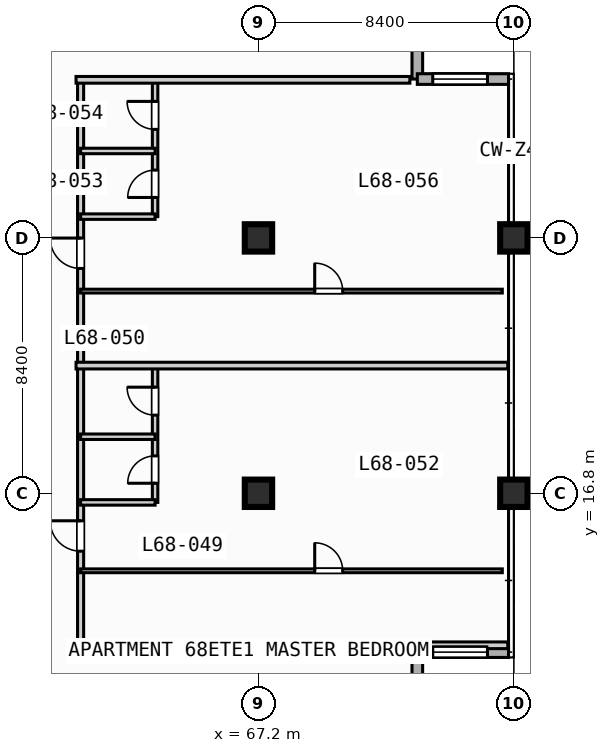
"""IFC4 building model, lengths in metres.
Left out: names, types, materials, properties, quantities, classifications, styles, units other than length and angle.
Written with IfcOpenShell. Run it as: python <this file> out.ifc"""

import sys

from ifc_helpers import new_model, si_unit, direction, frame, frame_2d, origin, origin_2d, place, context, subcontext, project, spatial, rectangle, extrude, element, fill, save


model = new_model("IFC4")
c1 = context("Model", 3, precision=1e-05, world=origin(), true_north=direction((0.0, 1.0)))
c2 = subcontext(c1, "Body", "Model", "MODEL_VIEW")
j1 = project(units=[si_unit("LENGTHUNIT", "METRE"), si_unit("PLANEANGLEUNIT", "RADIAN")], contexts=[c1])
p1 = place(None, origin())
s1 = spatial("IfcSite", under=j1, at=p1, CompositionType="ELEMENT")
p2 = place(p1, origin())
s2 = spatial("IfcBuilding", under=s1, at=p2, CompositionType="ELEMENT")
p3 = place(p2, frame((0.0, 0.0, 274.9)))
s3 = spatial("IfcBuildingStorey", under=s2, at=p3, CompositionType="ELEMENT", Elevation=274.9)
for number, where, z_axis, x_axis in (
    (1, (67.2, 16.8, 0.0), (0.0, 0.0, 1.0), (1.0, 0.0, 0.0)),
    (2, (67.2, 25.2, 0.0), (0.0, 0.0, 1.0), (1.0, 0.0, 0.0)),
    (3, (75.6, 16.8, 0.0), (0.0, 0.0, 1.0), (1.0, 0.0, 0.0)),
    (4, (75.6, 25.2, 0.0), (0.0, 0.0, 1.0), (1.0, 0.0, 0.0)),
):
    element("IfcColumn", number, at=place(p3, frame(where, z_axis=z_axis, x_axis=x_axis)), inside=s3, PredefinedType="COLUMN", context=c2, shape_type="SweptSolid", body=[
        extrude(rectangle(XDim=0.9, YDim=0.9, at=origin_2d()), origin(), (0.0, 0.0, 1.0), 3.7),
    ])
p4 = place(p3, frame((72.425, 33.425, 0.0), z_axis=(0.0, 0.0, 1.0), x_axis=(0.0, -1.0, 0.0)))
e5 = element("IfcWall", 5, at=p4, inside=s3, PredefinedType="STANDARD", context=c2, shape_type="SweptSolid", body=[
    extrude(rectangle(XDim=3.0, YDim=0.35, at=frame_2d((1.5, 0.0))), origin(), (0.0, 0.0, 1.0), 3.47),
])
p5 = place(p3, frame((72.425, 30.425, 0.0), z_axis=(0.0, 0.0, 1.0), x_axis=(1.0, 0.0, 0.0)))
e6 = element("IfcWall", 6, at=p5, inside=s3, PredefinedType="STANDARD", context=c2, shape_type="SweptSolid", body=[
    extrude(rectangle(XDim=3.0, YDim=0.35, at=frame_2d((1.5, 0.0))), origin(), (0.0, 0.0, 1.0), 3.47),
])
p6 = place(p5, frame((0.508, 0.0, 0.85)))
e7 = element("IfcOpeningElement", 7, at=p6, cuts=e6, PredefinedType="OPENING", context=c2, shape_type="SweptSolid", body=[
    extrude(rectangle(XDim=1.8, YDim=1.8, at=frame_2d((0.9, 0.9))), frame((0.0, 0.185, 0.0), z_axis=(0.0, -1.0, 0.0), x_axis=(1.0, 0.0, 0.0)), (0.0, 0.0, 1.0), 0.37),
])
p7 = place(p3, frame((75.425, 11.575, 0.0), z_axis=(0.0, 0.0, 1.0), x_axis=(-1.0, 0.0, 0.0)))
e8 = element("IfcWall", 8, at=p7, inside=s3, PredefinedType="STANDARD", context=c2, shape_type="SweptSolid", body=[
    extrude(rectangle(XDim=3.0, YDim=0.35, at=frame_2d((1.5, 0.0))), origin(), (0.0, 0.0, 1.0), 3.47),
])
p8 = place(p7, frame((0.692, 0.0, 0.85)))
e9 = element("IfcOpeningElement", 9, at=p8, cuts=e8, PredefinedType="OPENING", context=c2, shape_type="SweptSolid", body=[
    extrude(rectangle(XDim=1.8, YDim=1.8, at=frame_2d((0.9, 0.9))), frame((0.0, 0.185, 0.0), z_axis=(0.0, -1.0, 0.0), x_axis=(1.0, 0.0, 0.0)), (0.0, 0.0, 1.0), 0.37),
])
p9 = place(p3, frame((72.425, 11.575, 0.0), z_axis=(0.0, 0.0, 1.0), x_axis=(0.0, -1.0, 0.0)))
e10 = element("IfcWall", 10, at=p9, inside=s3, PredefinedType="STANDARD", context=c2, shape_type="SweptSolid", body=[
    extrude(rectangle(XDim=3.0, YDim=0.35, at=frame_2d((1.5, 0.0))), origin(), (0.0, 0.0, 1.0), 3.47),
])
p10 = place(p3, frame((61.35, 11.8, 0.0), z_axis=(0.0, 0.0, 1.0), x_axis=(0.0, 1.0, 0.0)))
e11 = element("IfcWall", 11, at=p10, inside=s3, PredefinedType="PARTITIONING", context=c2, shape_type="SweptSolid", body=[
    extrude(rectangle(XDim=18.6, YDim=0.2, at=frame_2d((9.3, 0.0))), origin(), (0.0, 0.0, 1.0), 3.47),
])
p11 = place(p10, frame((3.095, 0.0, 0.0)))
e12 = element("IfcOpeningElement", 12, at=p11, cuts=e11, PredefinedType="OPENING", context=c2, shape_type="SweptSolid", body=[
    extrude(rectangle(XDim=1.0, YDim=2.15, at=frame_2d((0.5, 1.075))), frame((0.0, 0.11, 0.0), z_axis=(0.0, -1.0, 0.0), x_axis=(1.0, 0.0, 0.0)), (0.0, 0.0, 1.0), 0.22),
])
p12 = place(p10, frame((12.395, 0.0, 0.0)))
e13 = element("IfcOpeningElement", 13, at=p12, cuts=e11, PredefinedType="OPENING", context=c2, shape_type="SweptSolid", body=[
    extrude(rectangle(XDim=1.0, YDim=2.15, at=frame_2d((0.5, 1.075))), frame((0.0, 0.11, 0.0), z_axis=(0.0, -1.0, 0.0), x_axis=(1.0, 0.0, 0.0)), (0.0, 0.0, 1.0), 0.22),
])
p13 = place(p3, frame((61.2, 11.8, 0.0), z_axis=(0.0, 0.0, 1.0), x_axis=(1.0, 0.0, 0.0)))
e14 = element("IfcWall", 14, at=p13, inside=s3, PredefinedType="PARTITIONING", context=c2, shape_type="SweptSolid", body=[
    extrude(rectangle(XDim=14.2, YDim=0.22, at=frame_2d((7.1, 0.0))), origin(), (0.0, 0.0, 1.0), 3.47),
])
p14 = place(p3, frame((63.8, 16.5, 0.0), z_axis=(0.0, 0.0, 1.0), x_axis=(0.0, 1.0, 0.0)))
e15 = element("IfcWall", 15, at=p14, inside=s3, PredefinedType="PLUMBINGWALL", context=c2, shape_type="SweptSolid", body=[
    extrude(rectangle(XDim=4.5, YDim=0.18, at=frame_2d((2.25, 0.0))), origin(), (0.0, 0.0, 1.0), 3.47),
])
p15 = place(p14, frame((0.63, 0.0, 0.0)))
e16 = element("IfcOpeningElement", 16, at=p15, cuts=e15, PredefinedType="OPENING", context=c2, shape_type="SweptSolid", body=[
    extrude(rectangle(XDim=0.9, YDim=2.1, at=frame_2d((0.45, 1.05))), frame((0.0, 0.1, 0.0), z_axis=(0.0, -1.0, 0.0), x_axis=(1.0, 0.0, 0.0)), (0.0, 0.0, 1.0), 0.2),
])
p16 = place(p14, frame((2.87, 0.0, 0.0)))
e17 = element("IfcOpeningElement", 17, at=p16, cuts=e15, PredefinedType="OPENING", context=c2, shape_type="SweptSolid", body=[
    extrude(rectangle(XDim=0.92, YDim=2.1, at=frame_2d((0.46, 1.05))), frame((0.0, 0.1, 0.0), z_axis=(0.0, -1.0, 0.0), x_axis=(1.0, 0.0, 0.0)), (0.0, 0.0, 1.0), 0.2),
])
for number, where, z_axis, x_axis in (
    (18, (61.35, 16.5, 0.0), (0.0, 0.0, 1.0), (1.0, 0.0, 0.0)),
    (19, (61.35, 18.66, 0.0), (0.0, 0.0, 1.0), (1.0, 0.0, 0.0)),
):
    element("IfcWall", number, at=place(p3, frame(where, z_axis=z_axis, x_axis=x_axis)), inside=s3, PredefinedType="PLUMBINGWALL", context=c2, shape_type="SweptSolid", body=[
        extrude(rectangle(XDim=2.45, YDim=0.18, at=frame_2d((1.225, 0.0))), origin(), (0.0, 0.0, 1.0), 3.47),
    ])
p17 = place(p3, frame((61.35, 14.25, 0.0), z_axis=(0.0, 0.0, 1.0), x_axis=(1.0, 0.0, 0.0)))
e20 = element("IfcWall", 20, at=p17, inside=s3, PredefinedType="PARTITIONING", context=c2, shape_type="SweptSolid", body=[
    extrude(rectangle(XDim=13.87, YDim=0.125, at=frame_2d((6.935, 0.0))), origin(), (0.0, 0.0, 1.0), 3.47),
])
p18 = place(p17, frame((7.7, 0.0, 0.0)))
e21 = element("IfcOpeningElement", 21, at=p18, cuts=e20, PredefinedType="OPENING", context=c2, shape_type="SweptSolid", body=[
    extrude(rectangle(XDim=0.92, YDim=2.1, at=frame_2d((0.46, 1.05))), frame((0.0, 0.073, 0.0), z_axis=(0.0, -1.0, 0.0), x_axis=(1.0, 0.0, 0.0)), (0.0, 0.0, 1.0), 0.145),
])
p19 = place(p3, frame((61.2, 21.0, 0.0), z_axis=(0.0, 0.0, 1.0), x_axis=(1.0, 0.0, 0.0)))
e22 = element("IfcWall", 22, at=p19, inside=s3, PredefinedType="PARTITIONING", context=c2, shape_type="SweptSolid", body=[
    extrude(rectangle(XDim=14.2, YDim=0.22, at=frame_2d((7.1, 0.0))), origin(), (0.0, 0.0, 1.0), 3.47),
])
p20 = place(p3, frame((63.8, 25.9, 0.0), z_axis=(0.0, 0.0, 1.0), x_axis=(0.0, 1.0, 0.0)))
e23 = element("IfcWall", 23, at=p20, inside=s3, PredefinedType="PLUMBINGWALL", context=c2, shape_type="SweptSolid", body=[
    extrude(rectangle(XDim=4.5, YDim=0.18, at=frame_2d((2.25, 0.0))), origin(), (0.0, 0.0, 1.0), 3.47),
])
p21 = place(p20, frame((0.63, 0.0, 0.0)))
e24 = element("IfcOpeningElement", 24, at=p21, cuts=e23, PredefinedType="OPENING", context=c2, shape_type="SweptSolid", body=[
    extrude(rectangle(XDim=0.9, YDim=2.1, at=frame_2d((0.45, 1.05))), frame((0.0, 0.1, 0.0), z_axis=(0.0, -1.0, 0.0), x_axis=(1.0, 0.0, 0.0)), (0.0, 0.0, 1.0), 0.2),
])
p22 = place(p20, frame((2.87, 0.0, 0.0)))
e25 = element("IfcOpeningElement", 25, at=p22, cuts=e23, PredefinedType="OPENING", context=c2, shape_type="SweptSolid", body=[
    extrude(rectangle(XDim=0.92, YDim=2.1, at=frame_2d((0.46, 1.05))), frame((0.0, 0.1, 0.0), z_axis=(0.0, -1.0, 0.0), x_axis=(1.0, 0.0, 0.0)), (0.0, 0.0, 1.0), 0.2),
])
for number, where, z_axis, x_axis in (
    (26, (61.35, 25.9, 0.0), (0.0, 0.0, 1.0), (1.0, 0.0, 0.0)),
    (27, (61.35, 28.06, 0.0), (0.0, 0.0, 1.0), (1.0, 0.0, 0.0)),
):
    element("IfcWall", number, at=place(p3, frame(where, z_axis=z_axis, x_axis=x_axis)), inside=s3, PredefinedType="PLUMBINGWALL", context=c2, shape_type="SweptSolid", body=[
        extrude(rectangle(XDim=2.45, YDim=0.18, at=frame_2d((1.225, 0.0))), origin(), (0.0, 0.0, 1.0), 3.47),
    ])
p23 = place(p3, frame((61.35, 23.45, 0.0), z_axis=(0.0, 0.0, 1.0), x_axis=(1.0, 0.0, 0.0)))
e28 = element("IfcWall", 28, at=p23, inside=s3, PredefinedType="PARTITIONING", context=c2, shape_type="SweptSolid", body=[
    extrude(rectangle(XDim=13.87, YDim=0.125, at=frame_2d((6.935, 0.0))), origin(), (0.0, 0.0, 1.0), 3.47),
])
p24 = place(p23, frame((7.7, 0.0, 0.0)))
e29 = element("IfcOpeningElement", 29, at=p24, cuts=e28, PredefinedType="OPENING", context=c2, shape_type="SweptSolid", body=[
    extrude(rectangle(XDim=0.92, YDim=2.1, at=frame_2d((0.46, 1.05))), frame((0.0, 0.073, 0.0), z_axis=(0.0, -1.0, 0.0), x_axis=(1.0, 0.0, 0.0)), (0.0, 0.0, 1.0), 0.145),
])
p25 = place(p3, frame((61.2, 30.4, 0.0), z_axis=(0.0, 0.0, 1.0), x_axis=(1.0, 0.0, 0.0)))
e30 = element("IfcWall", 30, at=p25, inside=s3, PredefinedType="PARTITIONING", context=c2, shape_type="SweptSolid", body=[
    extrude(rectangle(XDim=10.98, YDim=0.22, at=frame_2d((5.49, 0.0))), origin(), (0.0, 0.0, 1.0), 3.47),
])
p26 = place(p6, origin())
e31 = element("IfcWindow", 31, at=p26, inside=s3, PartitioningType="SINGLE_PANEL", PredefinedType="WINDOW", context=c2, shape_type="SweptSolid", body=[
    extrude(rectangle(XDim=1.8, YDim=1.8, at=frame_2d((0.9, 0.9))), frame((0.0, 0.03, 0.0), z_axis=(0.0, -1.0, 0.0), x_axis=(1.0, 0.0, 0.0)), (0.0, 0.0, 1.0), 0.06),
])
fill(e7, e31)
p27 = place(p8, origin())
e32 = element("IfcWindow", 32, at=p27, inside=s3, PartitioningType="SINGLE_PANEL", PredefinedType="WINDOW", context=c2, shape_type="SweptSolid", body=[
    extrude(rectangle(XDim=1.8, YDim=1.8, at=frame_2d((0.9, 0.9))), frame((0.0, 0.03, 0.0), z_axis=(0.0, -1.0, 0.0), x_axis=(1.0, 0.0, 0.0)), (0.0, 0.0, 1.0), 0.06),
])
fill(e9, e32)
p28 = place(p11, origin())
e33 = element("IfcDoor", 33, at=p28, inside=s3, OperationType="SINGLE_SWING_RIGHT", PredefinedType="DOOR", context=c2, shape_type="SweptSolid", body=[
    extrude(rectangle(XDim=1.0, YDim=2.15, at=frame_2d((0.5, 1.075))), frame((0.0, 0.025, 0.0), z_axis=(0.0, -1.0, 0.0), x_axis=(1.0, 0.0, 0.0)), (0.0, 0.0, 1.0), 0.05),
])
fill(e12, e33)
p29 = place(p12, origin())
e34 = element("IfcDoor", 34, at=p29, inside=s3, OperationType="SINGLE_SWING_RIGHT", PredefinedType="DOOR", context=c2, shape_type="SweptSolid", body=[
    extrude(rectangle(XDim=1.0, YDim=2.15, at=frame_2d((0.5, 1.075))), frame((0.0, 0.025, 0.0), z_axis=(0.0, -1.0, 0.0), x_axis=(1.0, 0.0, 0.0)), (0.0, 0.0, 1.0), 0.05),
])
fill(e13, e34)
p30 = place(p15, origin())
e35 = element("IfcDoor", 35, at=p30, inside=s3, OperationType="SINGLE_SWING_LEFT", PredefinedType="DOOR", context=c2, shape_type="SweptSolid", body=[
    extrude(rectangle(XDim=0.9, YDim=2.1, at=frame_2d((0.45, 1.05))), frame((0.0, 0.025, 0.0), z_axis=(0.0, -1.0, 0.0), x_axis=(1.0, 0.0, 0.0)), (0.0, 0.0, 1.0), 0.05),
])
fill(e16, e35)
p31 = place(p16, origin())
e36 = element("IfcDoor", 36, at=p31, inside=s3, OperationType="SINGLE_SWING_RIGHT", PredefinedType="DOOR", context=c2, shape_type="SweptSolid", body=[
    extrude(rectangle(XDim=0.92, YDim=2.1, at=frame_2d((0.46, 1.05))), frame((0.0, 0.025, 0.0), z_axis=(0.0, -1.0, 0.0), x_axis=(1.0, 0.0, 0.0)), (0.0, 0.0, 1.0), 0.05),
])
fill(e17, e36)
p32 = place(p18, origin())
e37 = element("IfcDoor", 37, at=p32, inside=s3, OperationType="SINGLE_SWING_LEFT", PredefinedType="DOOR", context=c2, shape_type="SweptSolid", body=[
    extrude(rectangle(XDim=0.92, YDim=2.1, at=frame_2d((0.46, 1.05))), frame((0.0, 0.025, 0.0), z_axis=(0.0, -1.0, 0.0), x_axis=(1.0, 0.0, 0.0)), (0.0, 0.0, 1.0), 0.05),
])
fill(e21, e37)
p33 = place(p21, origin())
e38 = element("IfcDoor", 38, at=p33, inside=s3, OperationType="SINGLE_SWING_LEFT", PredefinedType="DOOR", context=c2, shape_type="SweptSolid", body=[
    extrude(rectangle(XDim=0.9, YDim=2.1, at=frame_2d((0.45, 1.05))), frame((0.0, 0.025, 0.0), z_axis=(0.0, -1.0, 0.0), x_axis=(1.0, 0.0, 0.0)), (0.0, 0.0, 1.0), 0.05),
])
fill(e24, e38)
p34 = place(p22, origin())
e39 = element("IfcDoor", 39, at=p34, inside=s3, OperationType="SINGLE_SWING_RIGHT", PredefinedType="DOOR", context=c2, shape_type="SweptSolid", body=[
    extrude(rectangle(XDim=0.92, YDim=2.1, at=frame_2d((0.46, 1.05))), frame((0.0, 0.025, 0.0), z_axis=(0.0, -1.0, 0.0), x_axis=(1.0, 0.0, 0.0)), (0.0, 0.0, 1.0), 0.05),
])
fill(e25, e39)
p35 = place(p24, origin())
e40 = element("IfcDoor", 40, at=p35, inside=s3, OperationType="SINGLE_SWING_LEFT", PredefinedType="DOOR", context=c2, shape_type="SweptSolid", body=[
    extrude(rectangle(XDim=0.92, YDim=2.1, at=frame_2d((0.46, 1.05))), frame((0.0, 0.025, 0.0), z_axis=(0.0, -1.0, 0.0), x_axis=(1.0, 0.0, 0.0)), (0.0, 0.0, 1.0), 0.05),
])
fill(e29, e40)
save(model, sys.argv[1])
